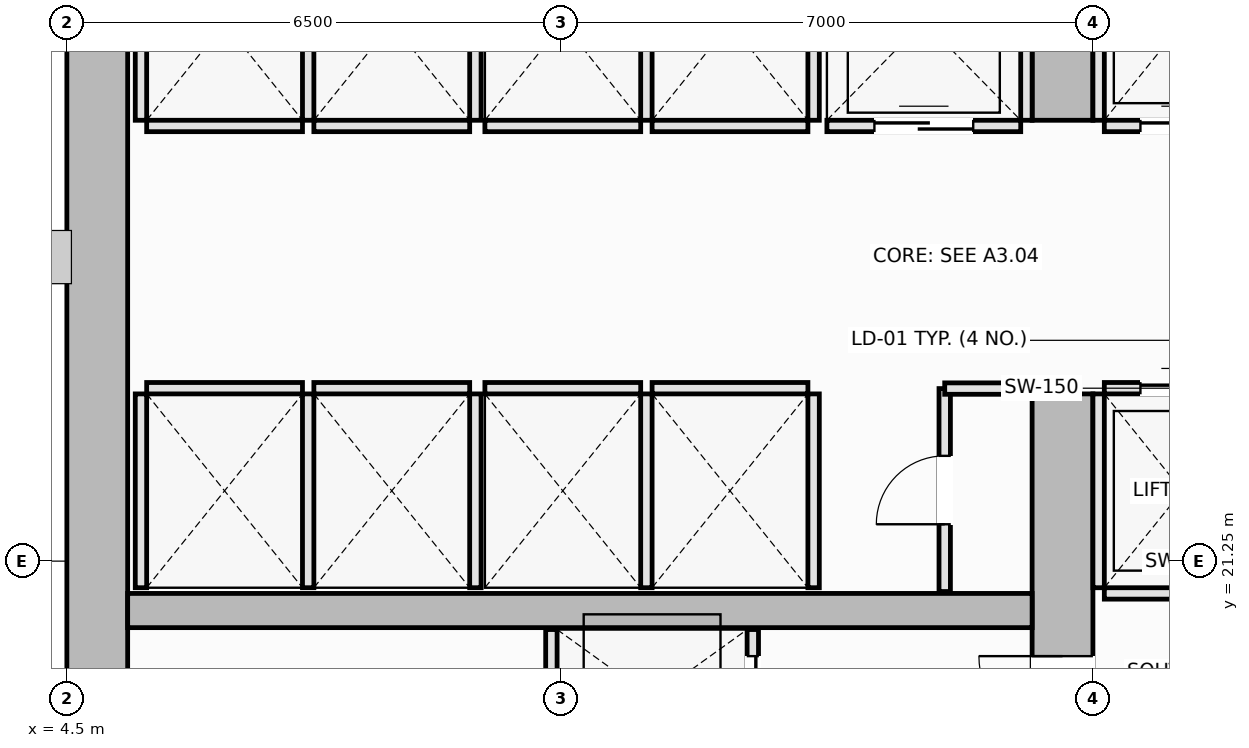
"""IFC4 building model, lengths in metres.
Left out: names, types, materials, properties, quantities, classifications, styles, units other than length and angle.
Written with IfcOpenShell. Run it as: python <this file> out.ifc"""

import sys

from ifc_helpers import new_model, si_unit, direction, frame, frame_2d, origin, place, context, subcontext, project, spatial, rectangle, extrude, element, fill, save


model = new_model("IFC4")
c1 = context("Model", 3, precision=1e-05, world=origin(), true_north=direction((0.0, 1.0)))
c2 = subcontext(c1, "Body", "Model", "MODEL_VIEW")
j1 = project(units=[si_unit("LENGTHUNIT", "METRE"), si_unit("PLANEANGLEUNIT", "RADIAN")], contexts=[c1])
p1 = place(None, origin())
s1 = spatial("IfcSite", under=j1, at=p1, CompositionType="ELEMENT")
p2 = place(p1, origin())
s2 = spatial("IfcBuilding", under=s1, at=p2, CompositionType="ELEMENT")
p3 = place(p2, frame((0.0, 0.0, 36.25)))
s3 = spatial("IfcBuildingStorey", under=s2, at=p3, CompositionType="ELEMENT", Elevation=36.25)
p4 = place(p3, frame((4.9, 14.8, 0.0), z_axis=(0.0, 0.0, 1.0), x_axis=(0.0, 1.0, 0.0)))
e1 = element("IfcWall", 1, at=p4, inside=s3, PredefinedType="SHEAR", context=c2, shape_type="SweptSolid", body=[
    extrude(rectangle(XDim=20.9, YDim=0.8, at=frame_2d((10.45, 0.0))), origin(), (0.0, 0.0, 1.0), 3.55),
])
p5 = place(p3, frame((17.6, 14.8, 0.0), z_axis=(0.0, 0.0, 1.0), x_axis=(0.0, 1.0, 0.0)))
e2 = element("IfcWall", 2, at=p5, inside=s3, PredefinedType="SHEAR", context=c2, shape_type="SweptSolid", body=[
    extrude(rectangle(XDim=8.65, YDim=0.8, at=frame_2d((4.325, 0.0))), origin(), (0.0, 0.0, 1.0), 3.55),
])
p6 = place(p5, frame((4.1, 0.0, 0.0)))
e3 = element("IfcOpeningElement", 3, at=p6, cuts=e2, PredefinedType="OPENING", context=c2, shape_type="SweptSolid", body=[
    extrude(rectangle(XDim=1.1, YDim=2.15, at=frame_2d((0.55, 1.075))), frame((0.0, 0.41, 0.0), z_axis=(0.0, -1.0, 0.0), x_axis=(1.0, 0.0, 0.0)), (0.0, 0.0, 1.0), 0.82),
])
p7 = place(p3, frame((17.6, 27.05, 0.0), z_axis=(0.0, 0.0, 1.0), x_axis=(0.0, 1.0, 0.0)))
e4 = element("IfcWall", 4, at=p7, inside=s3, PredefinedType="SHEAR", context=c2, shape_type="SweptSolid", body=[
    extrude(rectangle(XDim=8.65, YDim=0.8, at=frame_2d((4.325, 0.0))), origin(), (0.0, 0.0, 1.0), 3.55),
])
p8 = place(p7, frame((3.45, 0.0, 0.0)))
e5 = element("IfcOpeningElement", 5, at=p8, cuts=e4, PredefinedType="OPENING", context=c2, shape_type="SweptSolid", body=[
    extrude(rectangle(XDim=1.1, YDim=2.15, at=frame_2d((0.55, 1.075))), frame((0.0, 0.41, 0.0), z_axis=(0.0, -1.0, 0.0), x_axis=(1.0, 0.0, 0.0)), (0.0, 0.0, 1.0), 0.82),
])
p9 = place(p3, frame((5.3, 20.6, 0.0), z_axis=(0.0, 0.0, 1.0), x_axis=(1.0, 0.0, 0.0)))
e6 = element("IfcWall", 6, at=p9, inside=s3, PredefinedType="SHEAR", context=c2, shape_type="SweptSolid", body=[
    extrude(rectangle(XDim=11.9, YDim=0.45, at=frame_2d((5.95, 0.0))), origin(), (0.0, 0.0, 1.0), 3.55),
])
p10 = place(p3, frame((18.15, 20.825, 0.0), z_axis=(0.0, 0.0, 1.0), x_axis=(1.0, 0.0, 0.0)))
e7 = element("IfcWall", 7, at=p10, inside=s3, PredefinedType="PARTITIONING", context=c2, shape_type="SweptSolid", body=[
    extrude(rectangle(XDim=2.05, YDim=0.15, at=frame_2d((1.025, 0.0))), origin(), (0.0, 0.0, 1.0), 3.37),
])
p11 = place(p3, frame((18.15, 23.525, 0.0), z_axis=(0.0, 0.0, 1.0), x_axis=(1.0, 0.0, 0.0)))
e8 = element("IfcWall", 8, at=p11, inside=s3, PredefinedType="PARTITIONING", context=c2, shape_type="SweptSolid", body=[
    extrude(rectangle(XDim=2.05, YDim=0.15, at=frame_2d((1.025, 0.0))), origin(), (0.0, 0.0, 1.0), 3.37),
])
p12 = place(p11, frame((0.475, 0.0, 0.0)))
e9 = element("IfcOpeningElement", 9, at=p12, cuts=e8, PredefinedType="OPENING", context=c2, shape_type="SweptSolid", body=[
    extrude(rectangle(XDim=1.1, YDim=2.2, at=frame_2d((0.55, 1.1))), frame((0.0, 0.085, 0.0), z_axis=(0.0, -1.0, 0.0), x_axis=(1.0, 0.0, 0.0)), (0.0, 0.0, 1.0), 0.17),
])
p13 = place(p3, frame((18.075, 20.9, 0.0), z_axis=(0.0, 0.0, 1.0), x_axis=(0.0, 1.0, 0.0)))
e10 = element("IfcWall", 10, at=p13, inside=s3, PredefinedType="PARTITIONING", context=c2, shape_type="SweptSolid", body=[
    extrude(rectangle(XDim=2.55, YDim=0.15, at=frame_2d((1.275, 0.0))), origin(), (0.0, 0.0, 1.0), 3.37),
])
p14 = place(p3, frame((18.15, 26.975, 0.0), z_axis=(0.0, 0.0, 1.0), x_axis=(1.0, 0.0, 0.0)))
e11 = element("IfcWall", 11, at=p14, inside=s3, PredefinedType="PARTITIONING", context=c2, shape_type="SweptSolid", body=[
    extrude(rectangle(XDim=2.05, YDim=0.15, at=frame_2d((1.025, 0.0))), origin(), (0.0, 0.0, 1.0), 3.37),
])
p15 = place(p14, frame((0.475, 0.0, 0.0)))
e12 = element("IfcOpeningElement", 12, at=p15, cuts=e11, PredefinedType="OPENING", context=c2, shape_type="SweptSolid", body=[
    extrude(rectangle(XDim=1.1, YDim=2.2, at=frame_2d((0.55, 1.1))), frame((0.0, 0.085, 0.0), z_axis=(0.0, -1.0, 0.0), x_axis=(1.0, 0.0, 0.0)), (0.0, 0.0, 1.0), 0.17),
])
p16 = place(p3, frame((18.075, 27.05, 0.0), z_axis=(0.0, 0.0, 1.0), x_axis=(0.0, 1.0, 0.0)))
e13 = element("IfcWall", 13, at=p16, inside=s3, PredefinedType="PARTITIONING", context=c2, shape_type="SweptSolid", body=[
    extrude(rectangle(XDim=2.55, YDim=0.15, at=frame_2d((1.275, 0.0))), origin(), (0.0, 0.0, 1.0), 3.37),
])
p17 = place(p3, frame((5.55, 23.525, 0.0), z_axis=(0.0, 0.0, 1.0), x_axis=(1.0, 0.0, 0.0)))
e14 = element("IfcWall", 14, at=p17, inside=s3, PredefinedType="PARTITIONING", context=c2, shape_type="SweptSolid", body=[
    extrude(rectangle(XDim=2.05, YDim=0.15, at=frame_2d((1.025, 0.0))), origin(), (0.0, 0.0, 1.0), 3.37),
])
for number, where, z_axis, x_axis in (
    (15, (5.475, 20.9, 0.0), (0.0, 0.0, 1.0), (0.0, 1.0, 0.0)),
    (16, (7.675, 20.9, 0.0), (0.0, 0.0, 1.0), (0.0, 1.0, 0.0)),
):
    element("IfcWall", number, at=place(p3, frame(where, z_axis=z_axis, x_axis=x_axis)), inside=s3, PredefinedType="PARTITIONING", context=c2, shape_type="SweptSolid", body=[
        extrude(rectangle(XDim=2.55, YDim=0.15, at=frame_2d((1.275, 0.0))), origin(), (0.0, 0.0, 1.0), 3.37),
    ])
p18 = place(p3, frame((7.75, 23.525, 0.0), z_axis=(0.0, 0.0, 1.0), x_axis=(1.0, 0.0, 0.0)))
e17 = element("IfcWall", 17, at=p18, inside=s3, PredefinedType="PARTITIONING", context=c2, shape_type="SweptSolid", body=[
    extrude(rectangle(XDim=2.05, YDim=0.15, at=frame_2d((1.025, 0.0))), origin(), (0.0, 0.0, 1.0), 3.37),
])
p19 = place(p3, frame((9.875, 20.9, 0.0), z_axis=(0.0, 0.0, 1.0), x_axis=(0.0, 1.0, 0.0)))
e18 = element("IfcWall", 18, at=p19, inside=s3, PredefinedType="PARTITIONING", context=c2, shape_type="SweptSolid", body=[
    extrude(rectangle(XDim=2.55, YDim=0.15, at=frame_2d((1.275, 0.0))), origin(), (0.0, 0.0, 1.0), 3.37),
])
p20 = place(p3, frame((5.55, 26.975, 0.0), z_axis=(0.0, 0.0, 1.0), x_axis=(1.0, 0.0, 0.0)))
e19 = element("IfcWall", 19, at=p20, inside=s3, PredefinedType="PARTITIONING", context=c2, shape_type="SweptSolid", body=[
    extrude(rectangle(XDim=2.05, YDim=0.15, at=frame_2d((1.025, 0.0))), origin(), (0.0, 0.0, 1.0), 3.37),
])
for number, where, z_axis, x_axis in (
    (20, (5.475, 27.05, 0.0), (0.0, 0.0, 1.0), (0.0, 1.0, 0.0)),
    (21, (7.675, 27.05, 0.0), (0.0, 0.0, 1.0), (0.0, 1.0, 0.0)),
):
    element("IfcWall", number, at=place(p3, frame(where, z_axis=z_axis, x_axis=x_axis)), inside=s3, PredefinedType="PARTITIONING", context=c2, shape_type="SweptSolid", body=[
        extrude(rectangle(XDim=2.55, YDim=0.15, at=frame_2d((1.275, 0.0))), origin(), (0.0, 0.0, 1.0), 3.37),
    ])
p21 = place(p3, frame((7.75, 26.975, 0.0), z_axis=(0.0, 0.0, 1.0), x_axis=(1.0, 0.0, 0.0)))
e22 = element("IfcWall", 22, at=p21, inside=s3, PredefinedType="PARTITIONING", context=c2, shape_type="SweptSolid", body=[
    extrude(rectangle(XDim=2.05, YDim=0.15, at=frame_2d((1.025, 0.0))), origin(), (0.0, 0.0, 1.0), 3.37),
])
p22 = place(p3, frame((9.875, 27.05, 0.0), z_axis=(0.0, 0.0, 1.0), x_axis=(0.0, 1.0, 0.0)))
e23 = element("IfcWall", 23, at=p22, inside=s3, PredefinedType="PARTITIONING", context=c2, shape_type="SweptSolid", body=[
    extrude(rectangle(XDim=2.55, YDim=0.15, at=frame_2d((1.275, 0.0))), origin(), (0.0, 0.0, 1.0), 3.37),
])
p23 = place(p3, frame((10.0, 23.525, 0.0), z_axis=(0.0, 0.0, 1.0), x_axis=(1.0, 0.0, 0.0)))
e24 = element("IfcWall", 24, at=p23, inside=s3, PredefinedType="PARTITIONING", context=c2, shape_type="SweptSolid", body=[
    extrude(rectangle(XDim=2.05, YDim=0.15, at=frame_2d((1.025, 0.0))), origin(), (0.0, 0.0, 1.0), 3.37),
])
p24 = place(p3, frame((12.125, 20.9, 0.0), z_axis=(0.0, 0.0, 1.0), x_axis=(0.0, 1.0, 0.0)))
e25 = element("IfcWall", 25, at=p24, inside=s3, PredefinedType="PARTITIONING", context=c2, shape_type="SweptSolid", body=[
    extrude(rectangle(XDim=2.55, YDim=0.15, at=frame_2d((1.275, 0.0))), origin(), (0.0, 0.0, 1.0), 3.37),
])
p25 = place(p3, frame((12.2, 23.525, 0.0), z_axis=(0.0, 0.0, 1.0), x_axis=(1.0, 0.0, 0.0)))
e26 = element("IfcWall", 26, at=p25, inside=s3, PredefinedType="PARTITIONING", context=c2, shape_type="SweptSolid", body=[
    extrude(rectangle(XDim=2.05, YDim=0.15, at=frame_2d((1.025, 0.0))), origin(), (0.0, 0.0, 1.0), 3.37),
])
p26 = place(p3, frame((14.325, 20.9, 0.0), z_axis=(0.0, 0.0, 1.0), x_axis=(0.0, 1.0, 0.0)))
e27 = element("IfcWall", 27, at=p26, inside=s3, PredefinedType="PARTITIONING", context=c2, shape_type="SweptSolid", body=[
    extrude(rectangle(XDim=2.55, YDim=0.15, at=frame_2d((1.275, 0.0))), origin(), (0.0, 0.0, 1.0), 3.37),
])
p27 = place(p3, frame((10.0, 26.975, 0.0), z_axis=(0.0, 0.0, 1.0), x_axis=(1.0, 0.0, 0.0)))
e28 = element("IfcWall", 28, at=p27, inside=s3, PredefinedType="PARTITIONING", context=c2, shape_type="SweptSolid", body=[
    extrude(rectangle(XDim=2.05, YDim=0.15, at=frame_2d((1.025, 0.0))), origin(), (0.0, 0.0, 1.0), 3.37),
])
p28 = place(p3, frame((12.125, 27.05, 0.0), z_axis=(0.0, 0.0, 1.0), x_axis=(0.0, 1.0, 0.0)))
e29 = element("IfcWall", 29, at=p28, inside=s3, PredefinedType="PARTITIONING", context=c2, shape_type="SweptSolid", body=[
    extrude(rectangle(XDim=2.55, YDim=0.15, at=frame_2d((1.275, 0.0))), origin(), (0.0, 0.0, 1.0), 3.37),
])
p29 = place(p3, frame((12.2, 26.975, 0.0), z_axis=(0.0, 0.0, 1.0), x_axis=(1.0, 0.0, 0.0)))
e30 = element("IfcWall", 30, at=p29, inside=s3, PredefinedType="PARTITIONING", context=c2, shape_type="SweptSolid", body=[
    extrude(rectangle(XDim=2.05, YDim=0.15, at=frame_2d((1.025, 0.0))), origin(), (0.0, 0.0, 1.0), 3.37),
])
p30 = place(p3, frame((14.325, 27.05, 0.0), z_axis=(0.0, 0.0, 1.0), x_axis=(0.0, 1.0, 0.0)))
e31 = element("IfcWall", 31, at=p30, inside=s3, PredefinedType="PARTITIONING", context=c2, shape_type="SweptSolid", body=[
    extrude(rectangle(XDim=2.55, YDim=0.15, at=frame_2d((1.275, 0.0))), origin(), (0.0, 0.0, 1.0), 3.37),
])
p31 = place(p3, frame((14.5, 26.975, 0.0), z_axis=(0.0, 0.0, 1.0), x_axis=(1.0, 0.0, 0.0)))
e32 = element("IfcWall", 32, at=p31, inside=s3, PredefinedType="PARTITIONING", context=c2, shape_type="SweptSolid", body=[
    extrude(rectangle(XDim=2.55, YDim=0.15, at=frame_2d((1.275, 0.0))), origin(), (0.0, 0.0, 1.0), 3.37),
])
p32 = place(p31, frame((0.625, 0.0, 0.0)))
e33 = element("IfcOpeningElement", 33, at=p32, cuts=e32, PredefinedType="OPENING", context=c2, shape_type="SweptSolid", body=[
    extrude(rectangle(XDim=1.3, YDim=2.2, at=frame_2d((0.65, 1.1))), frame((0.0, 0.085, 0.0), z_axis=(0.0, -1.0, 0.0), x_axis=(1.0, 0.0, 0.0)), (0.0, 0.0, 1.0), 0.17),
])
p33 = place(p3, frame((17.125, 27.05, 0.0), z_axis=(0.0, 0.0, 1.0), x_axis=(0.0, 1.0, 0.0)))
e34 = element("IfcWall", 34, at=p33, inside=s3, PredefinedType="PARTITIONING", context=c2, shape_type="SweptSolid", body=[
    extrude(rectangle(XDim=2.6, YDim=0.15, at=frame_2d((1.3, 0.0))), origin(), (0.0, 0.0, 1.0), 3.37),
])
p34 = place(p3, frame((10.875, 18.55, 0.0), z_axis=(0.0, 0.0, 1.0), x_axis=(0.0, 1.0, 0.0)))
e35 = element("IfcWall", 35, at=p34, inside=s3, PredefinedType="PARTITIONING", context=c2, shape_type="SweptSolid", body=[
    extrude(rectangle(XDim=1.8, YDim=0.15, at=frame_2d((0.9, 0.0))), origin(), (0.0, 0.0, 1.0), 3.37),
])
p35 = place(p3, frame((13.525, 18.55, 0.0), z_axis=(0.0, 0.0, 1.0), x_axis=(0.0, 1.0, 0.0)))
e36 = element("IfcWall", 36, at=p35, inside=s3, PredefinedType="PARTITIONING", context=c2, shape_type="SweptSolid", body=[
    extrude(rectangle(XDim=1.8, YDim=0.15, at=frame_2d((0.9, 0.0))), origin(), (0.0, 0.0, 1.0), 3.37),
])
p36 = place(p35, frame((0.35, 0.0, 0.0)))
e37 = element("IfcOpeningElement", 37, at=p36, cuts=e36, PredefinedType="OPENING", context=c2, shape_type="SweptSolid", body=[
    extrude(rectangle(XDim=1.1, YDim=2.2, at=frame_2d((0.55, 1.1))), frame((0.0, 0.085, 0.0), z_axis=(0.0, -1.0, 0.0), x_axis=(1.0, 0.0, 0.0)), (0.0, 0.0, 1.0), 0.17),
])
p37 = place(p3, frame((16.05, 20.85, 0.0), z_axis=(0.0, 0.0, 1.0), x_axis=(0.0, 1.0, 0.0)))
e38 = element("IfcWall", 38, at=p37, inside=s3, PredefinedType="PARTITIONING", context=c2, shape_type="SweptSolid", body=[
    extrude(rectangle(XDim=2.67, YDim=0.15, at=frame_2d((1.335, 0.0))), origin(), (0.0, 0.0, 1.0), 3.37),
])
p38 = place(p37, frame((0.885, 0.0, 0.0)))
e39 = element("IfcOpeningElement", 39, at=p38, cuts=e38, PredefinedType="OPENING", context=c2, shape_type="SweptSolid", body=[
    extrude(rectangle(XDim=0.9, YDim=2.1, at=frame_2d((0.45, 1.05))), frame((0.0, 0.085, 0.0), z_axis=(0.0, -1.0, 0.0), x_axis=(1.0, 0.0, 0.0)), (0.0, 0.0, 1.0), 0.17),
])
p39 = place(p3, frame((16.05, 23.52, 0.0), z_axis=(0.0, 0.0, 1.0), x_axis=(1.0, 0.0, 0.0)))
e40 = element("IfcWall", 40, at=p39, inside=s3, PredefinedType="PARTITIONING", context=c2, shape_type="SweptSolid", body=[
    extrude(rectangle(XDim=1.17, YDim=0.15, at=frame_2d((0.585, 0.0))), origin(), (0.0, 0.0, 1.0), 3.37),
])
p40 = place(p12, origin())
e41 = element("IfcDoor", 41, at=p40, inside=s3, OperationType="DOUBLE_DOOR_SLIDING", PredefinedType="DOOR", context=c2, shape_type="SweptSolid", body=[
    extrude(rectangle(XDim=1.1, YDim=2.2, at=frame_2d((0.55, 1.1))), frame((0.0, 0.025, 0.0), z_axis=(0.0, -1.0, 0.0), x_axis=(1.0, 0.0, 0.0)), (0.0, 0.0, 1.0), 0.05),
])
fill(e9, e41)
p41 = place(p15, origin())
e42 = element("IfcDoor", 42, at=p41, inside=s3, OperationType="DOUBLE_DOOR_SLIDING", PredefinedType="DOOR", context=c2, shape_type="SweptSolid", body=[
    extrude(rectangle(XDim=1.1, YDim=2.2, at=frame_2d((0.55, 1.1))), frame((0.0, 0.025, 0.0), z_axis=(0.0, -1.0, 0.0), x_axis=(1.0, 0.0, 0.0)), (0.0, 0.0, 1.0), 0.05),
])
fill(e12, e42)
p42 = place(p32, origin())
e43 = element("IfcDoor", 43, at=p42, inside=s3, OperationType="DOUBLE_DOOR_SLIDING", PredefinedType="DOOR", context=c2, shape_type="SweptSolid", body=[
    extrude(rectangle(XDim=1.3, YDim=2.2, at=frame_2d((0.65, 1.1))), frame((0.0, 0.025, 0.0), z_axis=(0.0, -1.0, 0.0), x_axis=(1.0, 0.0, 0.0)), (0.0, 0.0, 1.0), 0.05),
])
fill(e33, e43)
p43 = place(p36, origin())
e44 = element("IfcDoor", 44, at=p43, inside=s3, OperationType="DOUBLE_DOOR_SLIDING", PredefinedType="DOOR", context=c2, shape_type="SweptSolid", body=[
    extrude(rectangle(XDim=1.1, YDim=2.2, at=frame_2d((0.55, 1.1))), frame((0.0, 0.025, 0.0), z_axis=(0.0, -1.0, 0.0), x_axis=(1.0, 0.0, 0.0)), (0.0, 0.0, 1.0), 0.05),
])
fill(e37, e44)
p44 = place(p6, origin())
e45 = element("IfcDoor", 45, at=p44, inside=s3, OperationType="SINGLE_SWING_RIGHT", PredefinedType="DOOR", context=c2, shape_type="SweptSolid", body=[
    extrude(rectangle(XDim=1.1, YDim=2.15, at=frame_2d((0.55, 1.075))), frame((0.0, 0.025, 0.0), z_axis=(0.0, -1.0, 0.0), x_axis=(1.0, 0.0, 0.0)), (0.0, 0.0, 1.0), 0.05),
])
fill(e3, e45)
p45 = place(p38, origin())
e46 = element("IfcDoor", 46, at=p45, inside=s3, OperationType="SINGLE_SWING_LEFT", PredefinedType="DOOR", context=c2, shape_type="SweptSolid", body=[
    extrude(rectangle(XDim=0.9, YDim=2.1, at=frame_2d((0.45, 1.05))), frame((0.0, 0.025, 0.0), z_axis=(0.0, -1.0, 0.0), x_axis=(1.0, 0.0, 0.0)), (0.0, 0.0, 1.0), 0.05),
])
fill(e39, e46)
save(model, sys.argv[1])
